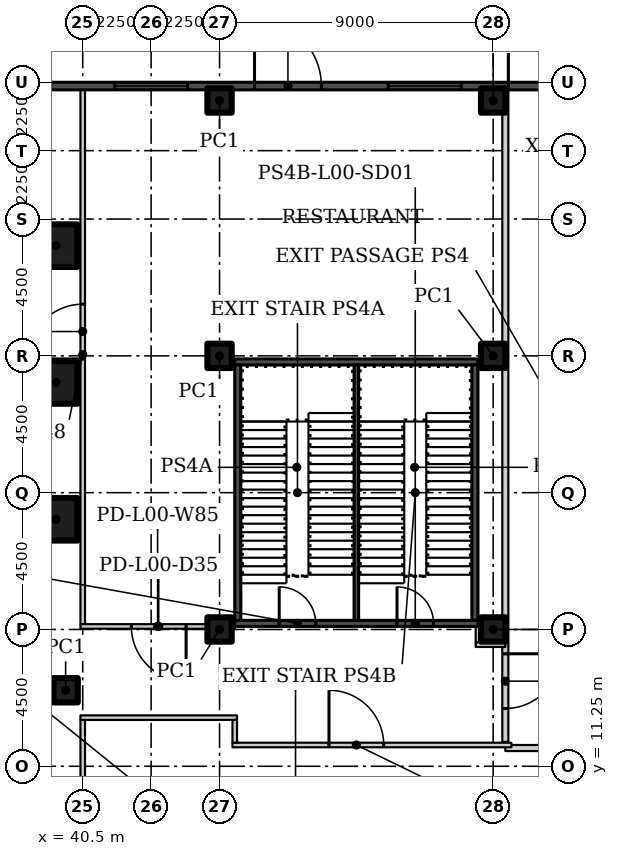
"""IFC4 building model, lengths in metres.
Left out: names, types, materials, properties, quantities, classifications, styles, units other than length and angle.
Written with IfcOpenShell. Run it as: python <this file> out.ifc"""

import sys

from ifc_helpers import new_model, si_unit, direction, frame, frame_2d, origin, origin_2d, place, context, subcontext, project, spatial, rectangle, hollow_rectangle, extrude, element, fill, save


model = new_model("IFC4")
c1 = context("Model", 3, precision=1e-05, world=origin(), true_north=direction((0.0, 1.0)))
c2 = subcontext(c1, "Body", "Model", "MODEL_VIEW")
j1 = project(units=[si_unit("LENGTHUNIT", "METRE"), si_unit("PLANEANGLEUNIT", "RADIAN")], contexts=[c1])
p1 = place(None, origin())
s1 = spatial("IfcSite", under=j1, at=p1, CompositionType="ELEMENT")
p2 = place(p1, origin())
s2 = spatial("IfcBuilding", under=s1, at=p2, CompositionType="ELEMENT")
p3 = place(p2, origin())
s3 = spatial("IfcBuildingStorey", under=s2, at=p3, CompositionType="ELEMENT", Elevation=0.0)
p4 = place(p3, frame((39.938, 13.75, 0.0)))
e1 = element("IfcColumn", 1, at=p4, inside=s3, PredefinedType="COLUMN", context=c2, shape_type="SweptSolid", body=[
    extrude(hollow_rectangle(XDim=0.8, YDim=0.8, WallThickness=0.03, at=origin_2d()), origin(), (0.0, 0.0, 1.0), 6.1),
])
for number, where in (
    (2, (39.625, 19.375, 0.0)),
    (3, (39.625, 23.875, 0.0)),
    (4, (39.625, 28.375, 0.0)),
):
    element("IfcColumn", number, at=place(p3, frame(where)), inside=s3, PredefinedType="COLUMN", context=c2, shape_type="SweptSolid", body=[
        extrude(hollow_rectangle(XDim=1.4, YDim=1.4, WallThickness=0.06, at=origin_2d()), origin(), (0.0, 0.0, 1.0), 6.1),
    ])
for number, where in (
    (5, (45.0, 15.75, 0.0)),
    (6, (45.0, 24.75, 0.0)),
    (7, (45.0, 33.15, 0.0)),
    (8, (54.0, 15.75, 0.0)),
    (9, (54.0, 24.75, 0.0)),
    (10, (54.0, 33.15, 0.0)),
):
    element("IfcColumn", number, at=place(p3, frame(where)), inside=s3, PredefinedType="COLUMN", context=c2, shape_type="SweptSolid", body=[
        extrude(hollow_rectangle(XDim=0.8, YDim=0.8, WallThickness=0.03, at=origin_2d()), origin(), (0.0, 0.0, 1.0), 6.1),
    ])
p5 = place(p3, frame((54.4, 11.85, 0.0)))
e11 = element("IfcWall", 11, at=p5, inside=s3, PredefinedType="PARTITIONING", context=c2, shape_type="SweptSolid", body=[
    extrude(rectangle(XDim=3.5, YDim=0.2, at=frame_2d((1.75, 0.0))), origin(), (0.0, 0.0, 1.0), 6.1),
])
p6 = place(p3, frame((54.4, 33.655, 0.0), z_axis=(0.0, 0.0, 1.0), x_axis=(0.0, -1.0, 0.0)))
e12 = element("IfcWall", 12, at=p6, inside=s3, PredefinedType="PARTITIONING", context=c2, shape_type="SweptSolid", body=[
    extrude(rectangle(XDim=21.605, YDim=0.2, at=frame_2d((10.802, 0.0))), origin(), (0.0, 0.0, 1.0), 6.1),
])
p7 = place(p6, frame((18.705, 0.0, 0.0)))
e13 = element("IfcOpeningElement", 13, at=p7, cuts=e12, PredefinedType="OPENING", context=c2, shape_type="SweptSolid", body=[
    extrude(rectangle(XDim=1.8, YDim=2.1, at=frame_2d((0.9, 1.05))), frame((0.0, 0.11, 0.0), z_axis=(0.0, -1.0, 0.0), x_axis=(1.0, 0.0, 0.0)), (0.0, 0.0, 1.0), 0.22),
])
p8 = place(p3, frame((40.5, 6.75, 0.0), z_axis=(0.0, 0.0, 1.0), x_axis=(0.0, 1.0, 0.0)))
e14 = element("IfcWall", 14, at=p8, inside=s3, PredefinedType="PARTITIONING", context=c2, shape_type="SweptSolid", body=[
    extrude(rectangle(XDim=6.025, YDim=0.15, at=frame_2d((3.012, 0.0))), origin(), (0.0, 0.0, 1.0), 6.1),
])
p9 = place(p8, frame((2.15, 0.0, 0.0)))
e15 = element("IfcOpeningElement", 15, at=p9, cuts=e14, PredefinedType="OPENING", context=c2, shape_type="SweptSolid", body=[
    extrude(rectangle(XDim=1.8, YDim=2.4, at=frame_2d((0.9, 1.2))), frame((0.0, 0.085, 0.0), z_axis=(0.0, -1.0, 0.0), x_axis=(1.0, 0.0, 0.0)), (0.0, 0.0, 1.0), 0.17),
])
p10 = place(p3, frame((40.5, 15.925, 0.0), z_axis=(0.0, 0.0, 1.0), x_axis=(0.0, 1.0, 0.0)))
e16 = element("IfcWall", 16, at=p10, inside=s3, PredefinedType="PARTITIONING", context=c2, shape_type="SweptSolid", body=[
    extrude(rectangle(XDim=17.73, YDim=0.15, at=frame_2d((8.865, 0.0))), origin(), (0.0, 0.0, 1.0), 6.1),
])
p11 = place(p10, frame((8.725, 0.0, 0.0)))
e17 = element("IfcOpeningElement", 17, at=p11, cuts=e16, PredefinedType="OPENING", context=c2, shape_type="SweptSolid", body=[
    extrude(rectangle(XDim=1.8, YDim=2.4, at=frame_2d((0.9, 1.2))), frame((0.0, 0.085, 0.0), z_axis=(0.0, -1.0, 0.0), x_axis=(1.0, 0.0, 0.0)), (0.0, 0.0, 1.0), 0.17),
])
p12 = place(p3, frame((45.425, 11.95, 0.0)))
e18 = element("IfcWall", 18, at=p12, inside=s3, PredefinedType="PARTITIONING", context=c2, shape_type="SweptSolid", body=[
    extrude(rectangle(XDim=9.175, YDim=0.15, at=frame_2d((4.587, 0.0))), origin(), (0.0, 0.0, 1.0), 6.1),
])
p13 = place(p12, frame((3.175, 0.0, 0.0)))
e19 = element("IfcOpeningElement", 19, at=p13, cuts=e18, PredefinedType="OPENING", context=c2, shape_type="SweptSolid", body=[
    extrude(rectangle(XDim=1.8, YDim=2.4, at=frame_2d((0.9, 1.2))), frame((0.0, 0.085, 0.0), z_axis=(0.0, -1.0, 0.0), x_axis=(1.0, 0.0, 0.0)), (0.0, 0.0, 1.0), 0.17),
])
p14 = place(p3, frame((54.4, 15.25, 0.0), z_axis=(0.0, 0.0, 1.0), x_axis=(-1.0, 0.0, 0.0)))
e20 = element("IfcWall", 20, at=p14, inside=s3, PredefinedType="PARTITIONING", context=c2, shape_type="SweptSolid", body=[
    extrude(rectangle(XDim=0.975, YDim=0.15, at=frame_2d((0.487, 0.0))), origin(), (0.0, 0.0, 1.0), 6.1),
])
p15 = place(p3, frame((40.425, 12.85, 0.0)))
e21 = element("IfcWall", 21, at=p15, inside=s3, PredefinedType="PARTITIONING", context=c2, shape_type="SweptSolid", body=[
    extrude(rectangle(XDim=5.15, YDim=0.15, at=frame_2d((2.575, 0.0))), origin(), (0.0, 0.0, 1.0), 6.1),
])
p16 = place(p3, frame((45.5, 12.775, 0.0), z_axis=(0.0, 0.0, 1.0), x_axis=(0.0, -1.0, 0.0)))
e22 = element("IfcWall", 22, at=p16, inside=s3, PredefinedType="PARTITIONING", context=c2, shape_type="SweptSolid", body=[
    extrude(rectangle(XDim=0.75, YDim=0.15, at=frame_2d((0.375, 0.0))), origin(), (0.0, 0.0, 1.0), 6.1),
])
p17 = place(p3, frame((45.5, 15.85, 0.0), z_axis=(0.0, 0.0, 1.0), x_axis=(-1.0, 0.0, 0.0)))
e23 = element("IfcWall", 23, at=p17, inside=s3, PredefinedType="PARTITIONING", context=c2, shape_type="SweptSolid", body=[
    extrude(rectangle(XDim=5.075, YDim=0.15, at=frame_2d((2.538, 0.0))), origin(), (0.0, 0.0, 1.0), 6.1),
])
p18 = place(p17, frame((1.6, 0.0, 0.0)))
e24 = element("IfcOpeningElement", 24, at=p18, cuts=e23, PredefinedType="OPENING", context=c2, shape_type="SweptSolid", body=[
    extrude(rectangle(XDim=1.8, YDim=2.4, at=frame_2d((0.9, 1.2))), frame((0.0, 0.085, 0.0), z_axis=(0.0, -1.0, 0.0), x_axis=(1.0, 0.0, 0.0)), (0.0, 0.0, 1.0), 0.17),
])
p19 = place(p3, frame((53.5, 15.325, 0.0), z_axis=(0.0, 0.0, 1.0), x_axis=(0.0, 1.0, 0.0)))
e25 = element("IfcWall", 25, at=p19, inside=s3, PredefinedType="PARTITIONING", context=c2, shape_type="SweptSolid", body=[
    extrude(rectangle(XDim=0.525, YDim=0.15, at=frame_2d((0.262, 0.0))), origin(), (0.0, 0.0, 1.0), 6.1),
])
p20 = place(p3, frame((-67.5, 33.625, 0.0)))
e26 = element("IfcWall", 26, at=p20, inside=s3, PredefinedType="SOLIDWALL", context=c2, shape_type="SweptSolid", body=[
    extrude(rectangle(XDim=130.5, YDim=0.25, at=frame_2d((65.25, 0.0))), origin(), (0.0, 0.0, 1.0), 6.15),
])
p21 = place(p20, frame((28.65, 0.0, 0.0)))
e27 = element("IfcOpeningElement", 27, at=p21, cuts=e26, PredefinedType="OPENING", context=c2, shape_type="SweptSolid", body=[
    extrude(rectangle(XDim=1.2, YDim=2.4, at=frame_2d((0.6, 1.2))), frame((0.0, 0.135, 0.0), z_axis=(0.0, -1.0, 0.0), x_axis=(1.0, 0.0, 0.0)), (0.0, 0.0, 1.0), 0.27),
])
p22 = place(p20, frame((37.25, 0.0, 0.0)))
e28 = element("IfcOpeningElement", 28, at=p22, cuts=e26, PredefinedType="OPENING", context=c2, shape_type="SweptSolid", body=[
    extrude(rectangle(XDim=2.0, YDim=2.4, at=frame_2d((1.0, 1.2))), frame((0.0, 0.135, 0.0), z_axis=(0.0, -1.0, 0.0), x_axis=(1.0, 0.0, 0.0)), (0.0, 0.0, 1.0), 0.27),
])
p23 = place(p20, frame((100.25, 0.0, 0.0)))
e29 = element("IfcOpeningElement", 29, at=p23, cuts=e26, PredefinedType="OPENING", context=c2, shape_type="SweptSolid", body=[
    extrude(rectangle(XDim=2.0, YDim=2.4, at=frame_2d((1.0, 1.2))), frame((0.0, 0.135, 0.0), z_axis=(0.0, -1.0, 0.0), x_axis=(1.0, 0.0, 0.0)), (0.0, 0.0, 1.0), 0.27),
])
p24 = place(p20, frame((55.25, 0.0, 0.0)))
e30 = element("IfcOpeningElement", 30, at=p24, cuts=e26, PredefinedType="OPENING", context=c2, shape_type="SweptSolid", body=[
    extrude(rectangle(XDim=2.0, YDim=2.4, at=frame_2d((1.0, 1.2))), frame((0.0, 0.135, 0.0), z_axis=(0.0, -1.0, 0.0), x_axis=(1.0, 0.0, 0.0)), (0.0, 0.0, 1.0), 0.27),
])
p25 = place(p20, frame((68.75, 0.0, 0.0)))
e31 = element("IfcOpeningElement", 31, at=p25, cuts=e26, PredefinedType="OPENING", context=c2, shape_type="SweptSolid", body=[
    extrude(rectangle(XDim=2.0, YDim=2.4, at=frame_2d((1.0, 1.2))), frame((0.0, 0.135, 0.0), z_axis=(0.0, -1.0, 0.0), x_axis=(1.0, 0.0, 0.0)), (0.0, 0.0, 1.0), 0.27),
])
p26 = place(p20, frame((10.25, 0.0, 0.0)))
e32 = element("IfcOpeningElement", 32, at=p26, cuts=e26, PredefinedType="OPENING", context=c2, shape_type="SweptSolid", body=[
    extrude(rectangle(XDim=2.0, YDim=2.4, at=frame_2d((1.0, 1.2))), frame((0.0, 0.135, 0.0), z_axis=(0.0, -1.0, 0.0), x_axis=(1.0, 0.0, 0.0)), (0.0, 0.0, 1.0), 0.27),
])
p27 = place(p20, frame((5.65, 0.0, 0.0)))
e33 = element("IfcOpeningElement", 33, at=p27, cuts=e26, PredefinedType="OPENING", context=c2, shape_type="SweptSolid", body=[
    extrude(rectangle(XDim=2.2, YDim=2.4, at=frame_2d((1.1, 1.2))), frame((0.0, 0.135, 0.0), z_axis=(0.0, -1.0, 0.0), x_axis=(1.0, 0.0, 0.0)), (0.0, 0.0, 1.0), 0.27),
])
p28 = place(p20, frame((113.65, 0.0, 0.0)))
e34 = element("IfcOpeningElement", 34, at=p28, cuts=e26, PredefinedType="OPENING", context=c2, shape_type="SweptSolid", body=[
    extrude(rectangle(XDim=2.2, YDim=2.4, at=frame_2d((1.1, 1.2))), frame((0.0, 0.135, 0.0), z_axis=(0.0, -1.0, 0.0), x_axis=(1.0, 0.0, 0.0)), (0.0, 0.0, 1.0), 0.27),
])
p29 = place(p20, frame((45.45, 0.0, 0.0)))
e35 = element("IfcOpeningElement", 35, at=p29, cuts=e26, PredefinedType="OPENING", context=c2, shape_type="SweptSolid", body=[
    extrude(rectangle(XDim=3.6, YDim=4.5, at=frame_2d((1.8, 2.25))), frame((0.0, 0.135, 0.0), z_axis=(0.0, -1.0, 0.0), x_axis=(1.0, 0.0, 0.0)), (0.0, 0.0, 1.0), 0.27),
])
p30 = place(p20, frame((91.15, 0.0, 0.0)))
e36 = element("IfcOpeningElement", 36, at=p30, cuts=e26, PredefinedType="OPENING", context=c2, shape_type="SweptSolid", body=[
    extrude(rectangle(XDim=2.2, YDim=2.4, at=frame_2d((1.1, 1.2))), frame((0.0, 0.135, 0.0), z_axis=(0.0, -1.0, 0.0), x_axis=(1.0, 0.0, 0.0)), (0.0, 0.0, 1.0), 0.27),
])
p31 = place(p20, frame((23.0, 0.0, 0.0)))
e37 = element("IfcOpeningElement", 37, at=p31, cuts=e26, PredefinedType="OPENING", context=c2, shape_type="SweptSolid", body=[
    extrude(rectangle(XDim=3.3, YDim=2.4, at=frame_2d((1.65, 1.2))), frame((0.0, 0.135, 0.0), z_axis=(0.0, -1.0, 0.0), x_axis=(1.0, 0.0, 0.0)), (0.0, 0.0, 1.0), 0.27),
])
p32 = place(p20, frame((59.0, 0.0, 0.0)))
e38 = element("IfcOpeningElement", 38, at=p32, cuts=e26, PredefinedType="OPENING", context=c2, shape_type="SweptSolid", body=[
    extrude(rectangle(XDim=3.3, YDim=2.4, at=frame_2d((1.65, 1.2))), frame((0.0, 0.135, 0.0), z_axis=(0.0, -1.0, 0.0), x_axis=(1.0, 0.0, 0.0)), (0.0, 0.0, 1.0), 0.27),
])
p33 = place(p20, frame((86.0, 0.0, 0.0)))
e39 = element("IfcOpeningElement", 39, at=p33, cuts=e26, PredefinedType="OPENING", context=c2, shape_type="SweptSolid", body=[
    extrude(rectangle(XDim=3.3, YDim=2.4, at=frame_2d((1.65, 1.2))), frame((0.0, 0.135, 0.0), z_axis=(0.0, -1.0, 0.0), x_axis=(1.0, 0.0, 0.0)), (0.0, 0.0, 1.0), 0.27),
])
p34 = place(p20, frame((122.0, 0.0, 0.0)))
e40 = element("IfcOpeningElement", 40, at=p34, cuts=e26, PredefinedType="OPENING", context=c2, shape_type="SweptSolid", body=[
    extrude(rectangle(XDim=3.3, YDim=2.4, at=frame_2d((1.65, 1.2))), frame((0.0, 0.135, 0.0), z_axis=(0.0, -1.0, 0.0), x_axis=(1.0, 0.0, 0.0)), (0.0, 0.0, 1.0), 0.27),
])
p35 = place(p20, frame((127.05, 0.0, 3.0)))
e41 = element("IfcOpeningElement", 41, at=p35, cuts=e26, PredefinedType="OPENING", context=c2, shape_type="SweptSolid", body=[
    extrude(rectangle(XDim=2.4, YDim=1.2, at=frame_2d((1.2, 0.6))), frame((0.0, 0.135, 0.0), z_axis=(0.0, -1.0, 0.0), x_axis=(1.0, 0.0, 0.0)), (0.0, 0.0, 1.0), 0.27),
])
p36 = place(p20, frame((118.05, 0.0, 3.0)))
e42 = element("IfcOpeningElement", 42, at=p36, cuts=e26, PredefinedType="OPENING", context=c2, shape_type="SweptSolid", body=[
    extrude(rectangle(XDim=2.4, YDim=1.2, at=frame_2d((1.2, 0.6))), frame((0.0, 0.135, 0.0), z_axis=(0.0, -1.0, 0.0), x_axis=(1.0, 0.0, 0.0)), (0.0, 0.0, 1.0), 0.27),
])
p37 = place(p20, frame((109.05, 0.0, 3.0)))
e43 = element("IfcOpeningElement", 43, at=p37, cuts=e26, PredefinedType="OPENING", context=c2, shape_type="SweptSolid", body=[
    extrude(rectangle(XDim=2.4, YDim=1.2, at=frame_2d((1.2, 0.6))), frame((0.0, 0.135, 0.0), z_axis=(0.0, -1.0, 0.0), x_axis=(1.0, 0.0, 0.0)), (0.0, 0.0, 1.0), 0.27),
])
p38 = place(p20, frame((104.55, 0.0, 3.0)))
e44 = element("IfcOpeningElement", 44, at=p38, cuts=e26, PredefinedType="OPENING", context=c2, shape_type="SweptSolid", body=[
    extrude(rectangle(XDim=2.4, YDim=1.2, at=frame_2d((1.2, 0.6))), frame((0.0, 0.135, 0.0), z_axis=(0.0, -1.0, 0.0), x_axis=(1.0, 0.0, 0.0)), (0.0, 0.0, 1.0), 0.27),
])
p39 = place(p20, frame((95.55, 0.0, 3.0)))
e45 = element("IfcOpeningElement", 45, at=p39, cuts=e26, PredefinedType="OPENING", context=c2, shape_type="SweptSolid", body=[
    extrude(rectangle(XDim=2.4, YDim=1.2, at=frame_2d((1.2, 0.6))), frame((0.0, 0.135, 0.0), z_axis=(0.0, -1.0, 0.0), x_axis=(1.0, 0.0, 0.0)), (0.0, 0.0, 1.0), 0.27),
])
p40 = place(p20, frame((82.05, 0.0, 3.0)))
e46 = element("IfcOpeningElement", 46, at=p40, cuts=e26, PredefinedType="OPENING", context=c2, shape_type="SweptSolid", body=[
    extrude(rectangle(XDim=2.4, YDim=1.2, at=frame_2d((1.2, 0.6))), frame((0.0, 0.135, 0.0), z_axis=(0.0, -1.0, 0.0), x_axis=(1.0, 0.0, 0.0)), (0.0, 0.0, 1.0), 0.27),
])
p41 = place(p20, frame((77.55, 0.0, 3.0)))
e47 = element("IfcOpeningElement", 47, at=p41, cuts=e26, PredefinedType="OPENING", context=c2, shape_type="SweptSolid", body=[
    extrude(rectangle(XDim=2.4, YDim=1.2, at=frame_2d((1.2, 0.6))), frame((0.0, 0.135, 0.0), z_axis=(0.0, -1.0, 0.0), x_axis=(1.0, 0.0, 0.0)), (0.0, 0.0, 1.0), 0.27),
])
p42 = place(p20, frame((73.05, 0.0, 3.0)))
e48 = element("IfcOpeningElement", 48, at=p42, cuts=e26, PredefinedType="OPENING", context=c2, shape_type="SweptSolid", body=[
    extrude(rectangle(XDim=2.4, YDim=1.2, at=frame_2d((1.2, 0.6))), frame((0.0, 0.135, 0.0), z_axis=(0.0, -1.0, 0.0), x_axis=(1.0, 0.0, 0.0)), (0.0, 0.0, 1.0), 0.27),
])
p43 = place(p20, frame((64.05, 0.0, 3.0)))
e49 = element("IfcOpeningElement", 49, at=p43, cuts=e26, PredefinedType="OPENING", context=c2, shape_type="SweptSolid", body=[
    extrude(rectangle(XDim=2.4, YDim=1.2, at=frame_2d((1.2, 0.6))), frame((0.0, 0.135, 0.0), z_axis=(0.0, -1.0, 0.0), x_axis=(1.0, 0.0, 0.0)), (0.0, 0.0, 1.0), 0.27),
])
p44 = place(p20, frame((50.55, 0.0, 3.0)))
e50 = element("IfcOpeningElement", 50, at=p44, cuts=e26, PredefinedType="OPENING", context=c2, shape_type="SweptSolid", body=[
    extrude(rectangle(XDim=2.4, YDim=1.2, at=frame_2d((1.2, 0.6))), frame((0.0, 0.135, 0.0), z_axis=(0.0, -1.0, 0.0), x_axis=(1.0, 0.0, 0.0)), (0.0, 0.0, 1.0), 0.27),
])
p45 = place(p20, frame((41.55, 0.0, 3.0)))
e51 = element("IfcOpeningElement", 51, at=p45, cuts=e26, PredefinedType="OPENING", context=c2, shape_type="SweptSolid", body=[
    extrude(rectangle(XDim=2.4, YDim=1.2, at=frame_2d((1.2, 0.6))), frame((0.0, 0.135, 0.0), z_axis=(0.0, -1.0, 0.0), x_axis=(1.0, 0.0, 0.0)), (0.0, 0.0, 1.0), 0.27),
])
p46 = place(p20, frame((32.55, 0.0, 3.0)))
e52 = element("IfcOpeningElement", 52, at=p46, cuts=e26, PredefinedType="OPENING", context=c2, shape_type="SweptSolid", body=[
    extrude(rectangle(XDim=2.4, YDim=1.2, at=frame_2d((1.2, 0.6))), frame((0.0, 0.135, 0.0), z_axis=(0.0, -1.0, 0.0), x_axis=(1.0, 0.0, 0.0)), (0.0, 0.0, 1.0), 0.27),
])
p47 = place(p20, frame((19.05, 0.0, 3.0)))
e53 = element("IfcOpeningElement", 53, at=p47, cuts=e26, PredefinedType="OPENING", context=c2, shape_type="SweptSolid", body=[
    extrude(rectangle(XDim=2.4, YDim=1.2, at=frame_2d((1.2, 0.6))), frame((0.0, 0.135, 0.0), z_axis=(0.0, -1.0, 0.0), x_axis=(1.0, 0.0, 0.0)), (0.0, 0.0, 1.0), 0.27),
])
p48 = place(p20, frame((14.55, 0.0, 3.0)))
e54 = element("IfcOpeningElement", 54, at=p48, cuts=e26, PredefinedType="OPENING", context=c2, shape_type="SweptSolid", body=[
    extrude(rectangle(XDim=2.4, YDim=1.2, at=frame_2d((1.2, 0.6))), frame((0.0, 0.135, 0.0), z_axis=(0.0, -1.0, 0.0), x_axis=(1.0, 0.0, 0.0)), (0.0, 0.0, 1.0), 0.27),
])
p49 = place(p20, frame((1.05, 0.0, 3.0)))
e55 = element("IfcOpeningElement", 55, at=p49, cuts=e26, PredefinedType="OPENING", context=c2, shape_type="SweptSolid", body=[
    extrude(rectangle(XDim=2.4, YDim=1.2, at=frame_2d((1.2, 0.6))), frame((0.0, 0.135, 0.0), z_axis=(0.0, -1.0, 0.0), x_axis=(1.0, 0.0, 0.0)), (0.0, 0.0, 1.0), 0.27),
])
p50 = place(p3, frame((45.5, 15.95, 0.0)))
e56 = element("IfcWall", 56, at=p50, inside=s3, PredefinedType="SHEAR", context=c2, shape_type="SweptSolid", body=[
    extrude(rectangle(XDim=8.0, YDim=0.2, at=frame_2d((4.0, 0.0))), origin(), (0.0, 0.0, 1.0), 6.1),
])
p51 = place(p50, frame((1.462, 0.0, 0.0)))
e57 = element("IfcOpeningElement", 57, at=p51, cuts=e56, PredefinedType="OPENING", context=c2, shape_type="SweptSolid", body=[
    extrude(rectangle(XDim=1.2, YDim=2.4, at=frame_2d((0.6, 1.2))), frame((0.0, 0.11, 0.0), z_axis=(0.0, -1.0, 0.0), x_axis=(1.0, 0.0, 0.0)), (0.0, 0.0, 1.0), 0.22),
])
p52 = place(p50, frame((5.337, 0.0, 0.0)))
e58 = element("IfcOpeningElement", 58, at=p52, cuts=e56, PredefinedType="OPENING", context=c2, shape_type="SweptSolid", body=[
    extrude(rectangle(XDim=1.2, YDim=2.4, at=frame_2d((0.6, 1.2))), frame((0.0, 0.11, 0.0), z_axis=(0.0, -1.0, 0.0), x_axis=(1.0, 0.0, 0.0)), (0.0, 0.0, 1.0), 0.22),
])
p53 = place(p3, frame((45.5, 24.55, 0.0)))
e59 = element("IfcWall", 59, at=p53, inside=s3, PredefinedType="SHEAR", context=c2, shape_type="SweptSolid", body=[
    extrude(rectangle(XDim=8.0, YDim=0.2, at=frame_2d((4.0, 0.0))), origin(), (0.0, 0.0, 1.0), 6.1),
])
for number, where, z_axis, x_axis in (
    (60, (45.6, 16.05, 0.0), (0.0, 0.0, 1.0), (0.0, 1.0, 0.0)),
    (61, (53.4, 16.05, 0.0), (0.0, 0.0, 1.0), (0.0, 1.0, 0.0)),
):
    element("IfcWall", number, at=place(p3, frame(where, z_axis=z_axis, x_axis=x_axis)), inside=s3, PredefinedType="SHEAR", context=c2, shape_type="SweptSolid", body=[
        extrude(rectangle(XDim=8.4, YDim=0.2, at=frame_2d((4.2, 0.0))), origin(), (0.0, 0.0, 1.0), 6.1),
    ])
p54 = place(p3, frame((49.5, 16.05, 0.0), z_axis=(0.0, 0.0, 1.0), x_axis=(0.0, 1.0, 0.0)))
e62 = element("IfcWall", 62, at=p54, inside=s3, PredefinedType="SHEAR", context=c2, shape_type="SweptSolid", body=[
    extrude(rectangle(XDim=8.4, YDim=0.15, at=frame_2d((4.2, 0.0))), origin(), (0.0, 0.0, 1.0), 6.1),
])
p55 = place(p11, origin())
e63 = element("IfcDoor", 63, at=p55, inside=s3, OperationType="DOUBLE_DOOR_SINGLE_SWING", PredefinedType="DOOR", context=c2, shape_type="SweptSolid", body=[
    extrude(rectangle(XDim=1.8, YDim=2.4, at=frame_2d((0.9, 1.2))), frame((0.0, 0.025, 0.0), z_axis=(0.0, -1.0, 0.0), x_axis=(1.0, 0.0, 0.0)), (0.0, 0.0, 1.0), 0.05),
])
fill(e17, e63)
p56 = place(p13, origin())
e64 = element("IfcDoor", 64, at=p56, inside=s3, OperationType="DOUBLE_DOOR_SINGLE_SWING", PredefinedType="DOOR", context=c2, shape_type="SweptSolid", body=[
    extrude(rectangle(XDim=1.8, YDim=2.4, at=frame_2d((0.9, 1.2))), frame((0.0, 0.025, 0.0), z_axis=(0.0, -1.0, 0.0), x_axis=(1.0, 0.0, 0.0)), (0.0, 0.0, 1.0), 0.05),
])
fill(e19, e64)
p57 = place(p18, origin())
e65 = element("IfcDoor", 65, at=p57, inside=s3, OperationType="DOUBLE_DOOR_SINGLE_SWING", PredefinedType="DOOR", context=c2, shape_type="SweptSolid", body=[
    extrude(rectangle(XDim=1.8, YDim=2.4, at=frame_2d((0.9, 1.2))), frame((0.0, 0.025, 0.0), z_axis=(0.0, -1.0, 0.0), x_axis=(1.0, 0.0, 0.0)), (0.0, 0.0, 1.0), 0.05),
])
fill(e24, e65)
p58 = place(p7, origin())
e66 = element("IfcDoor", 66, at=p58, inside=s3, OperationType="DOUBLE_DOOR_SINGLE_SWING", PredefinedType="DOOR", context=c2, shape_type="SweptSolid", body=[
    extrude(rectangle(XDim=1.8, YDim=2.1, at=frame_2d((0.9, 1.05))), frame((0.0, 0.025, 0.0), z_axis=(0.0, -1.0, 0.0), x_axis=(1.0, 0.0, 0.0)), (0.0, 0.0, 1.0), 0.05),
])
fill(e13, e66)
p59 = place(p28, origin())
e67 = element("IfcDoor", 67, at=p59, inside=s3, OperationType="DOUBLE_DOOR_SINGLE_SWING", PredefinedType="DOOR", context=c2, shape_type="SweptSolid", body=[
    extrude(rectangle(XDim=2.2, YDim=2.4, at=frame_2d((1.1, 1.2))), frame((0.0, 0.025, 0.0), z_axis=(0.0, -1.0, 0.0), x_axis=(1.0, 0.0, 0.0)), (0.0, 0.0, 1.0), 0.05),
])
fill(e34, e67)
p60 = place(p34, origin())
e68 = element("IfcDoor", 68, at=p60, inside=s3, OperationType="DOUBLE_DOOR_SINGLE_SWING", PredefinedType="DOOR", context=c2, shape_type="SweptSolid", body=[
    extrude(rectangle(XDim=3.3, YDim=2.4, at=frame_2d((1.65, 1.2))), frame((0.0, 0.025, 0.0), z_axis=(0.0, -1.0, 0.0), x_axis=(1.0, 0.0, 0.0)), (0.0, 0.0, 1.0), 0.05),
])
fill(e40, e68)
p61 = place(p36, origin())
e69 = element("IfcWindow", 69, at=p61, inside=s3, PartitioningType="DOUBLE_PANEL_HORIZONTAL", PredefinedType="WINDOW", context=c2, shape_type="SweptSolid", body=[
    extrude(rectangle(XDim=2.4, YDim=1.2, at=frame_2d((1.2, 0.6))), frame((0.0, 0.03, 0.0), z_axis=(0.0, -1.0, 0.0), x_axis=(1.0, 0.0, 0.0)), (0.0, 0.0, 1.0), 0.06),
])
fill(e42, e69)
p62 = place(p37, origin())
e70 = element("IfcWindow", 70, at=p62, inside=s3, PartitioningType="DOUBLE_PANEL_HORIZONTAL", PredefinedType="WINDOW", context=c2, shape_type="SweptSolid", body=[
    extrude(rectangle(XDim=2.4, YDim=1.2, at=frame_2d((1.2, 0.6))), frame((0.0, 0.03, 0.0), z_axis=(0.0, -1.0, 0.0), x_axis=(1.0, 0.0, 0.0)), (0.0, 0.0, 1.0), 0.06),
])
fill(e43, e70)
p63 = place(p51, origin())
e71 = element("IfcDoor", 71, at=p63, inside=s3, OperationType="SINGLE_SWING_LEFT", PredefinedType="DOOR", context=c2, shape_type="SweptSolid", body=[
    extrude(rectangle(XDim=1.2, YDim=2.4, at=frame_2d((0.6, 1.2))), frame((0.0, 0.025, 0.0), z_axis=(0.0, -1.0, 0.0), x_axis=(1.0, 0.0, 0.0)), (0.0, 0.0, 1.0), 0.05),
])
fill(e57, e71)
p64 = place(p52, origin())
e72 = element("IfcDoor", 72, at=p64, inside=s3, OperationType="SINGLE_SWING_RIGHT", PredefinedType="DOOR", context=c2, shape_type="SweptSolid", body=[
    extrude(rectangle(XDim=1.2, YDim=2.4, at=frame_2d((0.6, 1.2))), frame((0.0, 0.025, 0.0), z_axis=(0.0, -1.0, 0.0), x_axis=(1.0, 0.0, 0.0)), (0.0, 0.0, 1.0), 0.05),
])
fill(e58, e72)
save(model, sys.argv[1])
